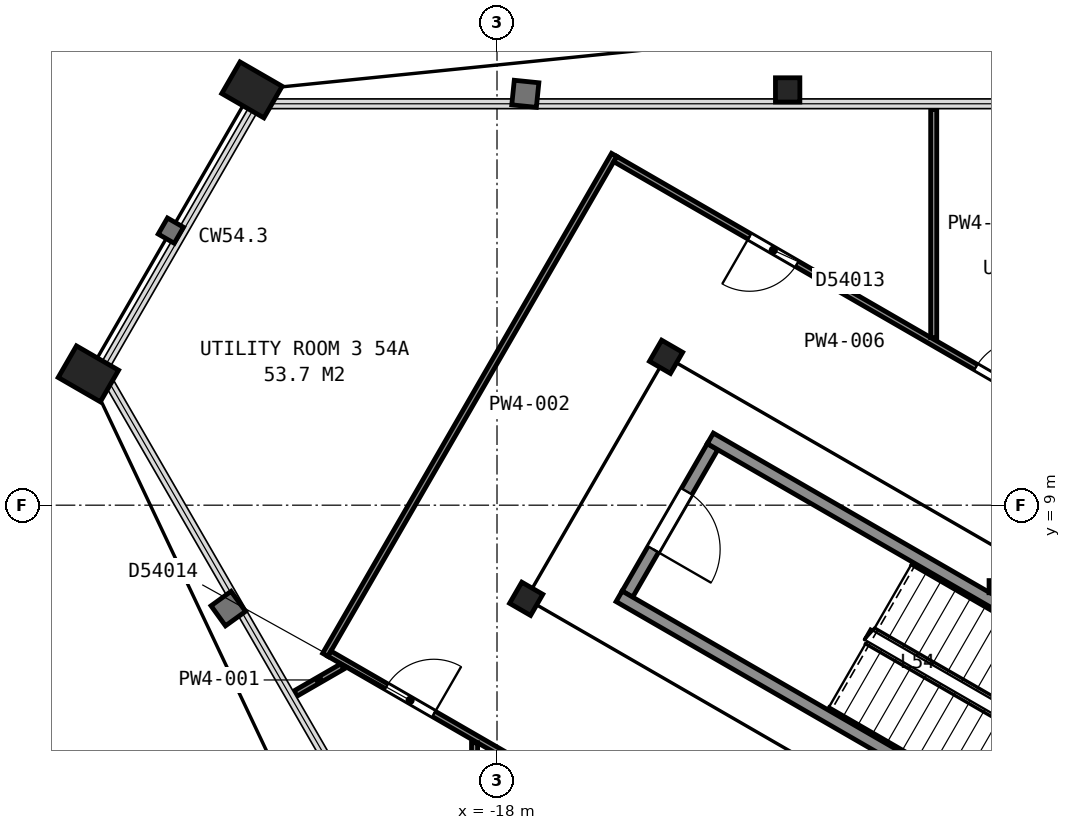
"""IFC4 building model, lengths in metres.
Left out: names, types, materials, properties, quantities, classifications, styles, units other than length and angle.
Written with IfcOpenShell. Run it as: python <this file> out.ifc"""

import sys

from ifc_helpers import new_model, si_unit, direction, frame, frame_2d, origin, origin_2d, place, context, subcontext, project, spatial, rectangle, hollow_rectangle, i_section, extrude, element, fill, save


model = new_model("IFC4")
c1 = context("Model", 3, precision=1e-05, world=origin(), true_north=direction((0.0, 1.0)))
c2 = subcontext(c1, "Body", "Model", "MODEL_VIEW")
j1 = project(units=[si_unit("LENGTHUNIT", "METRE"), si_unit("PLANEANGLEUNIT", "RADIAN")], contexts=[c1])
p1 = place(None, origin())
s1 = spatial("IfcSite", under=j1, at=p1, CompositionType="ELEMENT")
p2 = place(p1, origin())
s2 = spatial("IfcBuilding", under=s1, at=p2, CompositionType="ELEMENT")
p3 = place(p2, frame((0.0, 0.0, 217.5)))
s3 = spatial("IfcBuildingStorey", under=s2, at=p3, CompositionType="ELEMENT", Elevation=217.5)
p4 = place(p3, frame((-13.22, 15.83, 0.04), z_axis=(0.0, 0.0, 1.0), x_axis=(1.0, 0.0, 0.0)))
e1 = element("IfcColumn", 1, at=p4, inside=s3, PredefinedType="COLUMN", context=c2, shape_type="SweptSolid", body=[
    extrude(i_section(OverallWidth=0.401, OverallDepth=0.399, WebThickness=0.025, FlangeThickness=0.04, FilletRadius=0.015, at=origin_2d()), origin(), (0.0, 0.0, 1.0), 3.66),
])
for number, where, z_axis, x_axis in (
    (2, (-22.03, 15.83, 0.065), (0.0, 0.0, 1.0), (0.5, 0.866, 0.0)),
    (3, (-24.72, 11.16, 0.065), (0.0, 0.0, 1.0), (0.5, 0.866, 0.0)),
):
    element("IfcColumn", number, at=place(p3, frame(where, z_axis=z_axis, x_axis=x_axis)), inside=s3, PredefinedType="COLUMN", context=c2, shape_type="SweptSolid", body=[
        extrude(hollow_rectangle(XDim=0.6, YDim=0.8, WallThickness=0.05, at=origin_2d()), origin(), (0.0, 0.0, 1.0), 3.635),
    ])
for number, where, z_axis, x_axis in (
    (4, (-15.22, 11.44, 0.0), (0.0, 0.0, 1.0), (0.5, 0.866, 0.0)),
    (5, (-17.52, 7.46, 0.0), (0.0, 0.0, 1.0), (0.5, 0.866, 0.0)),
):
    element("IfcColumn", number, at=place(p3, frame(where, z_axis=z_axis, x_axis=x_axis)), inside=s3, PredefinedType="COLUMN", context=c2, shape_type="SweptSolid", body=[
        extrude(i_section(OverallWidth=0.401, OverallDepth=0.399, WebThickness=0.025, FlangeThickness=0.04, FilletRadius=0.015, at=origin_2d()), origin(), (0.0, 0.0, 1.0), 3.7),
    ])
p5 = place(p3, frame((-14.455, 9.962, 0.0), z_axis=(0.0, 0.0, 1.0), x_axis=(-0.500049511043, -0.865996816683, 0.0)))
e6 = element("IfcWall", 6, at=p5, inside=s3, PredefinedType="PARTITIONING", context=c2, shape_type="SweptSolid", body=[
    extrude(rectangle(XDim=2.8, YDim=0.2, at=frame_2d((1.4, 0.0))), origin(), (0.0, 0.0, 1.0), 3.45),
])
p6 = place(p5, frame((0.85, 0.0, 0.0)))
e7 = element("IfcOpeningElement", 7, at=p6, cuts=e6, PredefinedType="OPENING", context=c2, shape_type="SweptSolid", body=[
    extrude(rectangle(XDim=1.1, YDim=2.1, at=frame_2d((0.55, 1.05))), frame((0.0, 0.11, 0.0), z_axis=(0.0, -1.0, 0.0), x_axis=(1.0, 0.0, 0.0)), (0.0, 0.0, 1.0), 0.22),
])
for number, where, z_axis, x_axis in (
    (8, (-7.678, 2.701, 0.0), (0.0, 0.0, 1.0), (-0.866, 0.5, 0.0)),
    (9, (-6.178, 5.299, 0.0), (0.0, 0.0, 1.0), (-0.866, 0.5, 0.0)),
):
    element("IfcWall", number, at=place(p3, frame(where, z_axis=z_axis, x_axis=x_axis)), inside=s3, PredefinedType="PARTITIONING", context=c2, shape_type="SweptSolid", body=[
        extrude(rectangle(XDim=9.6, YDim=0.2, at=frame_2d((4.8, 0.0))), origin(), (0.0, 0.0, 1.0), 3.45),
    ])
p7 = place(p3, frame((-9.908, 7.66, 0.0), z_axis=(0.0, 0.0, 1.0), x_axis=(1.0, 0.0, 0.0)))
e10 = element("IfcWall", 10, at=p7, inside=s3, PredefinedType="PARTITIONING", context=c2, shape_type="SweptSolid", body=[
    extrude(rectangle(XDim=3.621, YDim=0.2, at=frame_2d((1.811, 0.0))), origin(), (0.0, 0.0, 1.0), 3.45),
])
p8 = place(p3, frame((-21.313, 5.903, 0.0), z_axis=(0.0, 0.0, 1.0), x_axis=(0.865952303503, 0.500126592033, 0.0)))
e11 = element("IfcWall", 11, at=p8, inside=s3, PredefinedType="PARTITIONING", context=c2, shape_type="SweptSolid", body=[
    extrude(rectangle(XDim=0.889, YDim=0.1, at=frame_2d((0.444, 0.0))), origin(), (0.0, 0.0, 1.0), 2.713),
])
p9 = place(p3, frame((-20.824, 6.539, 0.0), z_axis=(0.0, 0.0, 1.0), x_axis=(0.500297300687, 0.865853689098, 0.0)))
e12 = element("IfcWall", 12, at=p9, inside=s3, PredefinedType="PARTITIONING", context=c2, shape_type="SweptSolid", body=[
    extrude(rectangle(XDim=9.496, YDim=0.1, at=frame_2d((4.748, 0.0))), origin(), (0.0, 0.0, 1.0), 2.713),
])
p10 = place(p3, frame((-13.391, 2.305, 0.0), z_axis=(0.0, 0.0, 1.0), x_axis=(-0.86606177021, 0.499937006213, 0.0)))
e13 = element("IfcWall", 13, at=p10, inside=s3, PredefinedType="PARTITIONING", context=c2, shape_type="SweptSolid", body=[
    extrude(rectangle(XDim=8.504, YDim=0.1, at=frame_2d((4.252, 0.0))), origin(), (0.0, 0.0, 1.0), 2.713),
])
p11 = place(p10, frame((6.522, 0.0, 0.0)))
e14 = element("IfcOpeningElement", 14, at=p11, cuts=e13, PredefinedType="OPENING", context=c2, shape_type="SweptSolid", body=[
    extrude(rectangle(XDim=0.9, YDim=2.1, at=frame_2d((0.45, 1.05))), frame((0.0, 0.06, 0.0), z_axis=(0.0, -1.0, 0.0), x_axis=(1.0, 0.0, 0.0)), (0.0, 0.0, 1.0), 0.12),
])
p12 = place(p3, frame((-18.369, 2.678, 0.0), z_axis=(0.0, 0.0, 1.0), x_axis=(0.0, 1.0, 0.0)))
e15 = element("IfcWall", 15, at=p12, inside=s3, PredefinedType="PARTITIONING", context=c2, shape_type="SweptSolid", body=[
    extrude(rectangle(XDim=2.414, YDim=0.1, at=frame_2d((1.207, 0.0))), origin(), (0.0, 0.0, 1.0), 2.713),
])
p13 = place(p3, frame((-16.055, 14.693, 0.0), z_axis=(0.0, 0.0, 1.0), x_axis=(0.866070360466, -0.499922124658, 0.0)))
e16 = element("IfcWall", 16, at=p13, inside=s3, PredefinedType="PARTITIONING", context=c2, shape_type="SweptSolid", body=[
    extrude(rectangle(XDim=8.503, YDim=0.1, at=frame_2d((4.251, 0.0))), origin(), (0.0, 0.0, 1.0), 2.713),
])
p14 = place(p13, frame((6.847, 0.0, 0.0)))
e17 = element("IfcOpeningElement", 17, at=p14, cuts=e16, PredefinedType="OPENING", context=c2, shape_type="SweptSolid", body=[
    extrude(rectangle(XDim=0.9, YDim=2.1, at=frame_2d((0.45, 1.05))), frame((0.0, 0.06, 0.0), z_axis=(0.0, -1.0, 0.0), x_axis=(1.0, 0.0, 0.0)), (0.0, 0.0, 1.0), 0.12),
])
p15 = place(p13, frame((2.55, 0.0, 0.0)))
e18 = element("IfcOpeningElement", 18, at=p15, cuts=e16, PredefinedType="OPENING", context=c2, shape_type="SweptSolid", body=[
    extrude(rectangle(XDim=0.9, YDim=2.1, at=frame_2d((0.45, 1.05))), frame((0.0, 0.06, 0.0), z_axis=(0.0, -1.0, 0.0), x_axis=(1.0, 0.0, 0.0)), (0.0, 0.0, 1.0), 0.12),
])
p16 = place(p3, frame((-10.818, 11.757, 0.0), z_axis=(0.0, 0.0, 1.0), x_axis=(0.0, 1.0, 0.0)))
e19 = element("IfcWall", 19, at=p16, inside=s3, PredefinedType="PARTITIONING", context=c2, shape_type="SweptSolid", body=[
    extrude(rectangle(XDim=3.75, YDim=0.1, at=frame_2d((1.875, 0.0))), origin(), (0.0, 0.0, 1.0), 2.713),
])
p17 = place(p6, origin())
e20 = element("IfcDoor", 20, at=p17, inside=s3, OperationType="SINGLE_SWING_RIGHT", PredefinedType="DOOR", context=c2, shape_type="SweptSolid", body=[
    extrude(rectangle(XDim=1.1, YDim=2.1, at=frame_2d((0.55, 1.05))), frame((0.0, 0.025, 0.0), z_axis=(0.0, -1.0, 0.0), x_axis=(1.0, 0.0, 0.0)), (0.0, 0.0, 1.0), 0.05),
])
fill(e7, e20)
p18 = place(p11, origin())
e21 = element("IfcDoor", 21, at=p18, inside=s3, OperationType="SINGLE_SWING_LEFT", PredefinedType="DOOR", context=c2, shape_type="SweptSolid", body=[
    extrude(rectangle(XDim=0.9, YDim=2.1, at=frame_2d((0.45, 1.05))), frame((0.0, 0.025, 0.0), z_axis=(0.0, -1.0, 0.0), x_axis=(1.0, 0.0, 0.0)), (0.0, 0.0, 1.0), 0.05),
])
fill(e14, e21)
p19 = place(p14, origin())
e22 = element("IfcDoor", 22, at=p19, inside=s3, OperationType="SINGLE_SWING_RIGHT", PredefinedType="DOOR", context=c2, shape_type="SweptSolid", body=[
    extrude(rectangle(XDim=0.9, YDim=2.1, at=frame_2d((0.45, 1.05))), frame((0.0, 0.025, 0.0), z_axis=(0.0, -1.0, 0.0), x_axis=(1.0, 0.0, 0.0)), (0.0, 0.0, 1.0), 0.05),
])
fill(e17, e22)
p20 = place(p15, origin())
e23 = element("IfcDoor", 23, at=p20, inside=s3, OperationType="SINGLE_SWING_LEFT", PredefinedType="DOOR", context=c2, shape_type="SweptSolid", body=[
    extrude(rectangle(XDim=0.9, YDim=2.1, at=frame_2d((0.45, 1.05))), frame((0.0, 0.025, 0.0), z_axis=(0.0, -1.0, 0.0), x_axis=(1.0, 0.0, 0.0)), (0.0, 0.0, 1.0), 0.05),
])
fill(e18, e23)
save(model, sys.argv[1])
